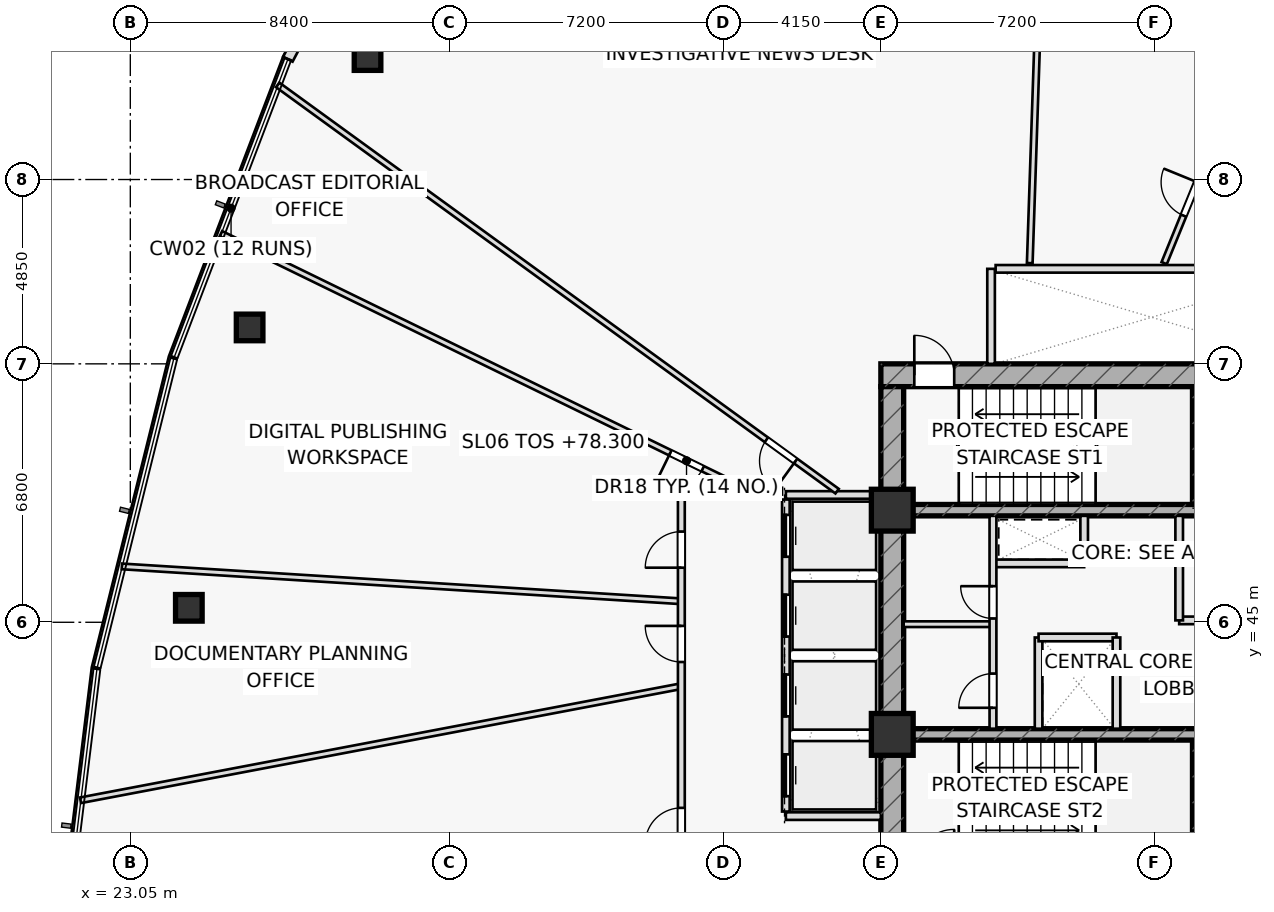
"""IFC4 building model, lengths in metres.
Left out: names, types, materials, properties, quantities, classifications, styles, units other than length and angle.
Written with IfcOpenShell. Run it as: python <this file> out.ifc"""

import sys

from ifc_helpers import new_model, si_unit, direction, frame, frame_2d, origin, origin_2d, place, context, subcontext, project, spatial, rectangle, hollow_rectangle, extrude, element, fill, save


model = new_model("IFC4")
c1 = context("Model", 3, precision=1e-05, world=origin(), true_north=direction((0.0, 1.0)))
c2 = subcontext(c1, "Body", "Model", "MODEL_VIEW")
j1 = project(units=[si_unit("LENGTHUNIT", "METRE"), si_unit("PLANEANGLEUNIT", "RADIAN")], contexts=[c1])
p1 = place(None, origin())
s1 = spatial("IfcSite", under=j1, at=p1, CompositionType="ELEMENT")
p2 = place(p1, origin())
s2 = spatial("IfcBuilding", under=s1, at=p2, CompositionType="ELEMENT")
p3 = place(p2, frame((0.0, 0.0, 78.3)))
s3 = spatial("IfcBuildingStorey", under=s2, at=p3, CompositionType="ELEMENT", Elevation=78.3)
for number, where, z_axis, x_axis in (
    (1, (51.11, 48.1, 0.0), (0.0, 0.0, 1.0), (0.0, 1.0, 0.0)),
    (2, (51.11, 38.8, 0.0), (0.0, 0.0, 1.0), (0.0, 1.0, 0.0)),
):
    element("IfcWall", number, at=place(p3, frame(where, z_axis=z_axis, x_axis=x_axis)), inside=s3, PredefinedType="SHEAR", context=c2, shape_type="SweptSolid", body=[
        extrude(rectangle(XDim=3.1, YDim=0.22, at=frame_2d((1.55, 0.0))), origin(), (0.0, 0.0, 1.0), 3.6),
    ])
p4 = place(p3, frame((42.8, 51.5, 0.0), z_axis=(0.0, 0.0, 1.0), x_axis=(1.0, 0.0, 0.0)))
e3 = element("IfcWall", 3, at=p4, inside=s3, PredefinedType="SHEAR", context=c2, shape_type="SweptSolid", body=[
    extrude(rectangle(XDim=14.4, YDim=0.6, at=frame_2d((7.2, 0.0))), origin(), (0.0, 0.0, 1.0), 3.6),
])
p5 = place(p4, frame((0.88, 0.0, 0.0)))
e4 = element("IfcOpeningElement", 4, at=p5, cuts=e3, PredefinedType="OPENING", context=c2, shape_type="SweptSolid", body=[
    extrude(rectangle(XDim=1.05, YDim=2.2, at=frame_2d((0.525, 1.1))), frame((0.0, 0.31, 0.0), z_axis=(0.0, -1.0, 0.0), x_axis=(1.0, 0.0, 0.0)), (0.0, 0.0, 1.0), 0.62),
])
p6 = place(p3, frame((43.1, 38.8, 0.0), z_axis=(0.0, 0.0, 1.0), x_axis=(0.0, 1.0, 0.0)))
e5 = element("IfcWall", 5, at=p6, inside=s3, PredefinedType="SHEAR", context=c2, shape_type="SweptSolid", body=[
    extrude(rectangle(XDim=12.4, YDim=0.6, at=frame_2d((6.2, 0.0))), origin(), (0.0, 0.0, 1.0), 3.6),
])
p7 = place(p3, frame((43.4, 47.95, 0.0), z_axis=(0.0, 0.0, 1.0), x_axis=(1.0, 0.0, 0.0)))
e6 = element("IfcWall", 6, at=p7, inside=s3, PredefinedType="SHEAR", context=c2, shape_type="SweptSolid", body=[
    extrude(rectangle(XDim=13.2, YDim=0.3, at=frame_2d((6.6, 0.0))), origin(), (0.0, 0.0, 1.0), 3.6),
])
p8 = place(p7, frame((8.345, 0.0, 0.0)))
e7 = element("IfcOpeningElement", 7, at=p8, cuts=e6, PredefinedType="OPENING", context=c2, shape_type="SweptSolid", body=[
    extrude(rectangle(XDim=1.15, YDim=2.2, at=frame_2d((0.575, 1.1))), frame((0.0, 0.16, 0.0), z_axis=(0.0, -1.0, 0.0), x_axis=(1.0, 0.0, 0.0)), (0.0, 0.0, 1.0), 0.32),
])
p9 = place(p7, frame((10.065, 0.0, 0.0)))
e8 = element("IfcOpeningElement", 8, at=p9, cuts=e6, PredefinedType="OPENING", context=c2, shape_type="SweptSolid", body=[
    extrude(rectangle(XDim=1.15, YDim=2.2, at=frame_2d((0.575, 1.1))), frame((0.0, 0.16, 0.0), z_axis=(0.0, -1.0, 0.0), x_axis=(1.0, 0.0, 0.0)), (0.0, 0.0, 1.0), 0.32),
])
p10 = place(p7, frame((11.645, 0.0, 0.0)))
e9 = element("IfcOpeningElement", 9, at=p10, cuts=e6, PredefinedType="OPENING", context=c2, shape_type="SweptSolid", body=[
    extrude(rectangle(XDim=1.15, YDim=2.2, at=frame_2d((0.575, 1.1))), frame((0.0, 0.16, 0.0), z_axis=(0.0, -1.0, 0.0), x_axis=(1.0, 0.0, 0.0)), (0.0, 0.0, 1.0), 0.32),
])
p11 = place(p3, frame((43.4, 42.05, 0.0), z_axis=(0.0, 0.0, 1.0), x_axis=(1.0, 0.0, 0.0)))
e10 = element("IfcWall", 10, at=p11, inside=s3, PredefinedType="SHEAR", context=c2, shape_type="SweptSolid", body=[
    extrude(rectangle(XDim=13.2, YDim=0.3, at=frame_2d((6.6, 0.0))), origin(), (0.0, 0.0, 1.0), 3.6),
])
for number, where, z_axis, x_axis in (
    (11, (43.1, 47.95, 0.0), (0.0, 0.0, 1.0), (1.0, 0.0, 0.0)),
    (12, (43.1, 42.05, 0.0), (0.0, 0.0, 1.0), (1.0, 0.0, 0.0)),
):
    element("IfcColumn", number, at=place(p3, frame(where, z_axis=z_axis, x_axis=x_axis)), inside=s3, PredefinedType="COLUMN", context=c2, shape_type="SweptSolid", body=[
        extrude(rectangle(XDim=1.1, YDim=1.1, at=origin_2d()), origin(), (0.0, 0.0, 1.0), 3.6),
    ])
for number, where, z_axis, x_axis in (
    (13, (29.292, 59.872, 0.0), (0.0, 0.0, 1.0), (1.0, 0.0, 0.0)),
    (14, (26.189, 52.758, 0.0), (0.0, 0.0, 1.0), (1.0, 0.0, 0.0)),
    (15, (24.59, 45.381, 0.0), (0.0, 0.0, 1.0), (1.0, 0.0, 0.0)),
):
    element("IfcColumn", number, at=place(p3, frame(where, z_axis=z_axis, x_axis=x_axis)), inside=s3, PredefinedType="COLUMN", context=c2, shape_type="SweptSolid", body=[
        extrude(hollow_rectangle(XDim=0.7, YDim=0.7, WallThickness=0.04, at=origin_2d()), origin(), (0.0, 0.0, 1.0), 3.6),
    ])
for number, where, z_axis, x_axis in (
    (16, (40.3, 39.9, 0.0), (0.0, 0.0, 1.0), (1.0, 0.0, 0.0)),
    (17, (40.3, 48.35, 0.0), (0.0, 0.0, 1.0), (1.0, 0.0, 0.0)),
    (18, (45.7, 51.8, 0.0), (0.0, 0.0, 1.0), (0.0, 1.0, 0.0)),
):
    element("IfcWall", number, at=place(p3, frame(where, z_axis=z_axis, x_axis=x_axis)), inside=s3, PredefinedType="PARTITIONING", context=c2, shape_type="SweptSolid", body=[
        extrude(rectangle(XDim=2.5, YDim=0.2, at=frame_2d((1.25, 0.0))), origin(), (0.0, 0.0, 1.0), 3.6),
    ])
p12 = place(p3, frame((45.75, 46.55, 0.0), z_axis=(0.0, 0.0, 1.0), x_axis=(1.0, 0.0, 0.0)))
e19 = element("IfcWall", 19, at=p12, inside=s3, PredefinedType="PARTITIONING", context=c2, shape_type="SweptSolid", body=[
    extrude(rectangle(XDim=2.4, YDim=0.2, at=frame_2d((1.2, 0.0))), origin(), (0.0, 0.0, 1.0), 3.6),
])
p13 = place(p3, frame((48.15, 46.55, 0.0), z_axis=(0.0, 0.0, 1.0), x_axis=(0.0, 1.0, 0.0)))
e20 = element("IfcWall", 20, at=p13, inside=s3, PredefinedType="PARTITIONING", context=c2, shape_type="SweptSolid", body=[
    extrude(rectangle(XDim=1.25, YDim=0.2, at=frame_2d((0.625, 0.0))), origin(), (0.0, 0.0, 1.0), 3.6),
])
p14 = place(p3, frame((46.95, 42.2, 0.0), z_axis=(0.0, 0.0, 1.0), x_axis=(0.0, 1.0, 0.0)))
e21 = element("IfcWall", 21, at=p14, inside=s3, PredefinedType="PARTITIONING", context=c2, shape_type="SweptSolid", body=[
    extrude(rectangle(XDim=2.4, YDim=0.2, at=frame_2d((1.2, 0.0))), origin(), (0.0, 0.0, 1.0), 3.6),
])
p15 = place(p3, frame((46.95, 44.6, 0.0), z_axis=(0.0, 0.0, 1.0), x_axis=(1.0, 0.0, 0.0)))
e22 = element("IfcWall", 22, at=p15, inside=s3, PredefinedType="PARTITIONING", context=c2, shape_type="SweptSolid", body=[
    extrude(rectangle(XDim=2.05, YDim=0.2, at=frame_2d((1.025, 0.0))), origin(), (0.0, 0.0, 1.0), 3.6),
])
p16 = place(p3, frame((50.65, 45.05, 0.0), z_axis=(0.0, 0.0, 1.0), x_axis=(1.0, 0.0, 0.0)))
e23 = element("IfcWall", 23, at=p16, inside=s3, PredefinedType="PARTITIONING", context=c2, shape_type="SweptSolid", body=[
    extrude(rectangle(XDim=5.95, YDim=0.2, at=frame_2d((2.975, 0.0))), origin(), (0.0, 0.0, 1.0), 3.6),
])
p17 = place(p16, frame((1.35, 0.0, 0.0)))
e24 = element("IfcOpeningElement", 24, at=p17, cuts=e23, PredefinedType="OPENING", context=c2, shape_type="SweptSolid", body=[
    extrude(rectangle(XDim=1.5, YDim=2.2, at=frame_2d((0.75, 1.1))), frame((0.0, 0.11, 0.0), z_axis=(0.0, -1.0, 0.0), x_axis=(1.0, 0.0, 0.0)), (0.0, 0.0, 1.0), 0.22),
])
p18 = place(p3, frame((50.65, 45.05, 0.0), z_axis=(0.0, 0.0, 1.0), x_axis=(0.0, 1.0, 0.0)))
e25 = element("IfcWall", 25, at=p18, inside=s3, PredefinedType="PARTITIONING", context=c2, shape_type="SweptSolid", body=[
    extrude(rectangle(XDim=2.75, YDim=0.2, at=frame_2d((1.375, 0.0))), origin(), (0.0, 0.0, 1.0), 3.6),
])
p19 = place(p3, frame((43.4, 44.95, 0.0), z_axis=(0.0, 0.0, 1.0), x_axis=(1.0, 0.0, 0.0)))
e26 = element("IfcWall", 26, at=p19, inside=s3, PredefinedType="PARTITIONING", context=c2, shape_type="SweptSolid", body=[
    extrude(rectangle(XDim=2.35, YDim=0.15, at=frame_2d((1.175, 0.0))), origin(), (0.0, 0.0, 1.0), 3.6),
])
p20 = place(p3, frame((45.75, 42.2, 0.0), z_axis=(0.0, 0.0, 1.0), x_axis=(0.0, 1.0, 0.0)))
e27 = element("IfcWall", 27, at=p20, inside=s3, PredefinedType="PARTITIONING", context=c2, shape_type="SweptSolid", body=[
    extrude(rectangle(XDim=5.6, YDim=0.18, at=frame_2d((2.8, 0.0))), origin(), (0.0, 0.0, 1.0), 3.6),
])
p21 = place(p20, frame((0.55, 0.0, 0.0)))
e28 = element("IfcOpeningElement", 28, at=p21, cuts=e27, PredefinedType="OPENING", context=c2, shape_type="SweptSolid", body=[
    extrude(rectangle(XDim=0.9, YDim=2.05, at=frame_2d((0.45, 1.025))), frame((0.0, 0.1, 0.0), z_axis=(0.0, -1.0, 0.0), x_axis=(1.0, 0.0, 0.0)), (0.0, 0.0, 1.0), 0.2),
])
p22 = place(p20, frame((2.9, 0.0, 0.0)))
e29 = element("IfcOpeningElement", 29, at=p22, cuts=e27, PredefinedType="OPENING", context=c2, shape_type="SweptSolid", body=[
    extrude(rectangle(XDim=0.85, YDim=2.05, at=frame_2d((0.425, 1.025))), frame((0.0, 0.1, 0.0), z_axis=(0.0, -1.0, 0.0), x_axis=(1.0, 0.0, 0.0)), (0.0, 0.0, 1.0), 0.2),
])
p23 = place(p3, frame((39.326, 48.45, 0.0), z_axis=(0.0, 0.0, 1.0), x_axis=(-0.898790760356, 0.438377883907, 0.0)))
e30 = element("IfcWall", 30, at=p23, inside=s3, PredefinedType="PARTITIONING", context=c2, shape_type="SweptSolid", body=[
    extrude(rectangle(XDim=15.456, YDim=0.15, at=frame_2d((7.728, 0.0))), origin(), (0.0, 0.0, 1.0), 2.975),
])
p24 = place(p23, frame((1.35, 0.0, 0.0)))
e31 = element("IfcOpeningElement", 31, at=p24, cuts=e30, PredefinedType="OPENING", context=c2, shape_type="SweptSolid", body=[
    extrude(rectangle(XDim=0.95, YDim=2.05, at=frame_2d((0.475, 1.025))), frame((0.0, 0.085, 0.0), z_axis=(0.0, -1.0, 0.0), x_axis=(1.0, 0.0, 0.0)), (0.0, 0.0, 1.0), 0.17),
])
p25 = place(p3, frame((37.55, 45.552, 0.0), z_axis=(0.0, 0.0, 1.0), x_axis=(-0.99806062042, 0.062249481657, 0.0)))
e32 = element("IfcWall", 32, at=p25, inside=s3, PredefinedType="PARTITIONING", context=c2, shape_type="SweptSolid", body=[
    extrude(rectangle(XDim=14.75, YDim=0.15, at=frame_2d((7.375, 0.0))), origin(), (0.0, 0.0, 1.0), 2.975),
])
p26 = place(p3, frame((37.55, 43.319, 0.0), z_axis=(0.0, 0.0, 1.0), x_axis=(-0.982437746544, -0.186590659376, 0.0)))
e33 = element("IfcWall", 33, at=p26, inside=s3, PredefinedType="PARTITIONING", context=c2, shape_type="SweptSolid", body=[
    extrude(rectangle(XDim=16.094, YDim=0.15, at=frame_2d((8.047, 0.0))), origin(), (0.0, 0.0, 1.0), 3.025),
])
p27 = place(p3, frame((50.255, 54.45, 0.0), z_axis=(0.0, 0.0, 1.0), x_axis=(0.377744353623, 0.92590993261, 0.0)))
e34 = element("IfcWall", 34, at=p27, inside=s3, PredefinedType="PARTITIONING", context=c2, shape_type="SweptSolid", body=[
    extrude(rectangle(XDim=14.522, YDim=0.15, at=frame_2d((7.261, 0.0))), origin(), (0.0, 0.0, 1.0), 2.975),
])
p28 = place(p27, frame((1.35, 0.0, 0.0)))
e35 = element("IfcOpeningElement", 35, at=p28, cuts=e34, PredefinedType="OPENING", context=c2, shape_type="SweptSolid", body=[
    extrude(rectangle(XDim=0.95, YDim=2.05, at=frame_2d((0.475, 1.025))), frame((0.0, 0.085, 0.0), z_axis=(0.0, -1.0, 0.0), x_axis=(1.0, 0.0, 0.0)), (0.0, 0.0, 1.0), 0.17),
])
p29 = place(p3, frame((46.718, 54.45, 0.0), z_axis=(0.0, 0.0, 1.0), x_axis=(0.033591693119, 0.999435639825, 0.0)))
e36 = element("IfcWall", 36, at=p29, inside=s3, PredefinedType="PARTITIONING", context=c2, shape_type="SweptSolid", body=[
    extrude(rectangle(XDim=19.173, YDim=0.15, at=frame_2d((9.586, 0.0))), origin(), (0.0, 0.0, 1.0), 3.025),
])
p30 = place(p3, frame((41.649, 48.45, 0.0), z_axis=(0.0, 0.0, 1.0), x_axis=(-0.809164130734, 0.587582683146, 0.0)))
e37 = element("IfcWall", 37, at=p30, inside=s3, PredefinedType="PARTITIONING", context=c2, shape_type="SweptSolid", body=[
    extrude(rectangle(XDim=18.193, YDim=0.15, at=frame_2d((9.097, 0.0))), origin(), (0.0, 0.0, 1.0), 2.975),
])
p31 = place(p30, frame((1.35, 0.0, 0.0)))
e38 = element("IfcOpeningElement", 38, at=p31, cuts=e37, PredefinedType="OPENING", context=c2, shape_type="SweptSolid", body=[
    extrude(rectangle(XDim=0.95, YDim=2.05, at=frame_2d((0.475, 1.025))), frame((0.0, 0.085, 0.0), z_axis=(0.0, -1.0, 0.0), x_axis=(1.0, 0.0, 0.0)), (0.0, 0.0, 1.0), 0.17),
])
p32 = place(p3, frame((37.55, 35.75, 0.0), z_axis=(0.0, 0.0, 1.0), x_axis=(0.0, 1.0, 0.0)))
e39 = element("IfcWall", 39, at=p32, inside=s3, PredefinedType="PARTITIONING", context=c2, shape_type="SweptSolid", body=[
    extrude(rectangle(XDim=12.75, YDim=0.18, at=frame_2d((6.375, 0.0))), origin(), (0.0, 0.0, 1.0), 2.975),
])
p33 = place(p32, frame((3.417, 0.0, 0.0)))
e40 = element("IfcOpeningElement", 40, at=p33, cuts=e39, PredefinedType="OPENING", context=c2, shape_type="SweptSolid", body=[
    extrude(rectangle(XDim=0.95, YDim=2.05, at=frame_2d((0.475, 1.025))), frame((0.0, 0.1, 0.0), z_axis=(0.0, -1.0, 0.0), x_axis=(1.0, 0.0, 0.0)), (0.0, 0.0, 1.0), 0.2),
])
p34 = place(p32, frame((8.205, 0.0, 0.0)))
e41 = element("IfcOpeningElement", 41, at=p34, cuts=e39, PredefinedType="OPENING", context=c2, shape_type="SweptSolid", body=[
    extrude(rectangle(XDim=0.95, YDim=2.05, at=frame_2d((0.475, 1.025))), frame((0.0, 0.1, 0.0), z_axis=(0.0, -1.0, 0.0), x_axis=(1.0, 0.0, 0.0)), (0.0, 0.0, 1.0), 0.2),
])
p35 = place(p32, frame((10.687, 0.0, 0.0)))
e42 = element("IfcOpeningElement", 42, at=p35, cuts=e39, PredefinedType="OPENING", context=c2, shape_type="SweptSolid", body=[
    extrude(rectangle(XDim=0.95, YDim=2.05, at=frame_2d((0.475, 1.025))), frame((0.0, 0.1, 0.0), z_axis=(0.0, -1.0, 0.0), x_axis=(1.0, 0.0, 0.0)), (0.0, 0.0, 1.0), 0.2),
])
p36 = place(p3, frame((37.5, 48.45, 0.0), z_axis=(0.0, 0.0, 1.0), x_axis=(1.0, 0.0, 0.0)))
e43 = element("IfcWall", 43, at=p36, inside=s3, PredefinedType="PARTITIONING", context=c2, shape_type="SweptSolid", body=[
    extrude(rectangle(XDim=2.7, YDim=0.18, at=frame_2d((1.35, 0.0))), origin(), (0.0, 0.0, 1.0), 3.6),
])
p37 = place(p3, frame((31.132, 67.275, 0.0), z_axis=(0.0, 0.0, 1.0), x_axis=(-0.466778115756, -0.884374462912, 0.0)))
e44 = element("IfcWall", 44, at=p37, inside=s3, PredefinedType="STANDARD", context=c2, shape_type="SweptSolid", body=[
    extrude(rectangle(XDim=8.434, YDim=0.28, at=frame_2d((4.217, 0.0))), origin(), (0.0, 0.0, 1.0), 3.6),
])
p38 = place(p3, frame((40.3, 40.02, 0.0), z_axis=(0.0, 0.0, 1.0), x_axis=(0.0, 1.0, 0.0)))
e45 = element("IfcWall", 45, at=p38, inside=s3, PredefinedType="PARTITIONING", context=c2, shape_type="SweptSolid", body=[
    extrude(rectangle(XDim=8.21, YDim=0.2, at=frame_2d((4.105, 0.0))), origin(), (0.0, 0.0, 1.0), 3.6),
])
p39 = place(p38, frame((0.405, 0.0, 0.0)))
e46 = element("IfcOpeningElement", 46, at=p39, cuts=e45, PredefinedType="OPENING", context=c2, shape_type="SweptSolid", body=[
    extrude(rectangle(XDim=1.1, YDim=2.15, at=frame_2d((0.55, 1.075))), frame((0.0, 0.11, 0.0), z_axis=(0.0, -1.0, 0.0), x_axis=(1.0, 0.0, 0.0)), (0.0, 0.0, 1.0), 0.22),
])
p40 = place(p38, frame((2.505, 0.0, 0.0)))
e47 = element("IfcOpeningElement", 47, at=p40, cuts=e45, PredefinedType="OPENING", context=c2, shape_type="SweptSolid", body=[
    extrude(rectangle(XDim=1.1, YDim=2.15, at=frame_2d((0.55, 1.075))), frame((0.0, 0.11, 0.0), z_axis=(0.0, -1.0, 0.0), x_axis=(1.0, 0.0, 0.0)), (0.0, 0.0, 1.0), 0.22),
])
p41 = place(p38, frame((4.605, 0.0, 0.0)))
e48 = element("IfcOpeningElement", 48, at=p41, cuts=e45, PredefinedType="OPENING", context=c2, shape_type="SweptSolid", body=[
    extrude(rectangle(XDim=1.1, YDim=2.15, at=frame_2d((0.55, 1.075))), frame((0.0, 0.11, 0.0), z_axis=(0.0, -1.0, 0.0), x_axis=(1.0, 0.0, 0.0)), (0.0, 0.0, 1.0), 0.22),
])
p42 = place(p38, frame((6.705, 0.0, 0.0)))
e49 = element("IfcOpeningElement", 49, at=p42, cuts=e45, PredefinedType="OPENING", context=c2, shape_type="SweptSolid", body=[
    extrude(rectangle(XDim=1.1, YDim=2.15, at=frame_2d((0.55, 1.075))), frame((0.0, 0.11, 0.0), z_axis=(0.0, -1.0, 0.0), x_axis=(1.0, 0.0, 0.0)), (0.0, 0.0, 1.0), 0.22),
])
p43 = place(p3, frame((49.0, 42.2, 0.0), z_axis=(0.0, 0.0, 1.0), x_axis=(0.0, 1.0, 0.0)))
e50 = element("IfcWall", 50, at=p43, inside=s3, PredefinedType="PARTITIONING", context=c2, shape_type="SweptSolid", body=[
    extrude(rectangle(XDim=2.4, YDim=0.2, at=frame_2d((1.2, 0.0))), origin(), (0.0, 0.0, 1.0), 3.6),
])
p44 = place(p3, frame((45.82, 54.3, 0.0), z_axis=(0.0, 0.0, 1.0), x_axis=(1.0, 0.0, 0.0)))
e51 = element("IfcWall", 51, at=p44, inside=s3, PredefinedType="PARTITIONING", context=c2, shape_type="SweptSolid", body=[
    extrude(rectangle(XDim=8.31, YDim=0.2, at=frame_2d((4.155, 0.0))), origin(), (0.0, 0.0, 1.0), 3.6),
])
p45 = place(p5, origin())
e52 = element("IfcDoor", 52, at=p45, inside=s3, OperationType="SINGLE_SWING_LEFT", PredefinedType="DOOR", context=c2, shape_type="SweptSolid", body=[
    extrude(rectangle(XDim=1.05, YDim=2.2, at=frame_2d((0.525, 1.1))), frame((0.0, 0.025, 0.0), z_axis=(0.0, -1.0, 0.0), x_axis=(1.0, 0.0, 0.0)), (0.0, 0.0, 1.0), 0.05),
])
fill(e4, e52)
p46 = place(p21, origin())
e53 = element("IfcDoor", 53, at=p46, inside=s3, OperationType="SINGLE_SWING_LEFT", PredefinedType="DOOR", context=c2, shape_type="SweptSolid", body=[
    extrude(rectangle(XDim=0.9, YDim=2.05, at=frame_2d((0.45, 1.025))), frame((0.0, 0.025, 0.0), z_axis=(0.0, -1.0, 0.0), x_axis=(1.0, 0.0, 0.0)), (0.0, 0.0, 1.0), 0.05),
])
fill(e28, e53)
p47 = place(p22, origin())
e54 = element("IfcDoor", 54, at=p47, inside=s3, OperationType="SINGLE_SWING_RIGHT", PredefinedType="DOOR", context=c2, shape_type="SweptSolid", body=[
    extrude(rectangle(XDim=0.85, YDim=2.05, at=frame_2d((0.425, 1.025))), frame((0.0, 0.025, 0.0), z_axis=(0.0, -1.0, 0.0), x_axis=(1.0, 0.0, 0.0)), (0.0, 0.0, 1.0), 0.05),
])
fill(e29, e54)
p48 = place(p24, origin())
e55 = element("IfcDoor", 55, at=p48, inside=s3, OperationType="SINGLE_SWING_RIGHT", PredefinedType="DOOR", context=c2, shape_type="SweptSolid", body=[
    extrude(rectangle(XDim=0.95, YDim=2.05, at=frame_2d((0.475, 1.025))), frame((0.0, 0.025, 0.0), z_axis=(0.0, -1.0, 0.0), x_axis=(1.0, 0.0, 0.0)), (0.0, 0.0, 1.0), 0.05),
])
fill(e31, e55)
p49 = place(p28, origin())
e56 = element("IfcDoor", 56, at=p49, inside=s3, OperationType="SINGLE_SWING_RIGHT", PredefinedType="DOOR", context=c2, shape_type="SweptSolid", body=[
    extrude(rectangle(XDim=0.95, YDim=2.05, at=frame_2d((0.475, 1.025))), frame((0.0, 0.025, 0.0), z_axis=(0.0, -1.0, 0.0), x_axis=(1.0, 0.0, 0.0)), (0.0, 0.0, 1.0), 0.05),
])
fill(e35, e56)
p50 = place(p31, origin())
e57 = element("IfcDoor", 57, at=p50, inside=s3, OperationType="SINGLE_SWING_LEFT", PredefinedType="DOOR", context=c2, shape_type="SweptSolid", body=[
    extrude(rectangle(XDim=0.95, YDim=2.05, at=frame_2d((0.475, 1.025))), frame((0.0, 0.025, 0.0), z_axis=(0.0, -1.0, 0.0), x_axis=(1.0, 0.0, 0.0)), (0.0, 0.0, 1.0), 0.05),
])
fill(e38, e57)
p51 = place(p33, origin())
e58 = element("IfcDoor", 58, at=p51, inside=s3, OperationType="SINGLE_SWING_LEFT", PredefinedType="DOOR", context=c2, shape_type="SweptSolid", body=[
    extrude(rectangle(XDim=0.95, YDim=2.05, at=frame_2d((0.475, 1.025))), frame((0.0, 0.025, 0.0), z_axis=(0.0, -1.0, 0.0), x_axis=(1.0, 0.0, 0.0)), (0.0, 0.0, 1.0), 0.05),
])
fill(e40, e58)
p52 = place(p34, origin())
e59 = element("IfcDoor", 59, at=p52, inside=s3, OperationType="SINGLE_SWING_RIGHT", PredefinedType="DOOR", context=c2, shape_type="SweptSolid", body=[
    extrude(rectangle(XDim=0.95, YDim=2.05, at=frame_2d((0.475, 1.025))), frame((0.0, 0.025, 0.0), z_axis=(0.0, -1.0, 0.0), x_axis=(1.0, 0.0, 0.0)), (0.0, 0.0, 1.0), 0.05),
])
fill(e41, e59)
p53 = place(p35, origin())
e60 = element("IfcDoor", 60, at=p53, inside=s3, OperationType="SINGLE_SWING_LEFT", PredefinedType="DOOR", context=c2, shape_type="SweptSolid", body=[
    extrude(rectangle(XDim=0.95, YDim=2.05, at=frame_2d((0.475, 1.025))), frame((0.0, 0.025, 0.0), z_axis=(0.0, -1.0, 0.0), x_axis=(1.0, 0.0, 0.0)), (0.0, 0.0, 1.0), 0.05),
])
fill(e42, e60)
p54 = place(p39, origin())
e61 = element("IfcDoor", 61, at=p54, inside=s3, OperationType="SLIDING_TO_LEFT", PredefinedType="DOOR", context=c2, shape_type="SweptSolid", body=[
    extrude(rectangle(XDim=1.1, YDim=2.15, at=frame_2d((0.55, 1.075))), frame((0.0, 0.025, 0.0), z_axis=(0.0, -1.0, 0.0), x_axis=(1.0, 0.0, 0.0)), (0.0, 0.0, 1.0), 0.05),
])
fill(e46, e61)
p55 = place(p40, origin())
e62 = element("IfcDoor", 62, at=p55, inside=s3, OperationType="SLIDING_TO_RIGHT", PredefinedType="DOOR", context=c2, shape_type="SweptSolid", body=[
    extrude(rectangle(XDim=1.1, YDim=2.15, at=frame_2d((0.55, 1.075))), frame((0.0, 0.025, 0.0), z_axis=(0.0, -1.0, 0.0), x_axis=(1.0, 0.0, 0.0)), (0.0, 0.0, 1.0), 0.05),
])
fill(e47, e62)
p56 = place(p41, origin())
e63 = element("IfcDoor", 63, at=p56, inside=s3, OperationType="SLIDING_TO_LEFT", PredefinedType="DOOR", context=c2, shape_type="SweptSolid", body=[
    extrude(rectangle(XDim=1.1, YDim=2.15, at=frame_2d((0.55, 1.075))), frame((0.0, 0.025, 0.0), z_axis=(0.0, -1.0, 0.0), x_axis=(1.0, 0.0, 0.0)), (0.0, 0.0, 1.0), 0.05),
])
fill(e48, e63)
p57 = place(p42, origin())
e64 = element("IfcDoor", 64, at=p57, inside=s3, OperationType="SLIDING_TO_RIGHT", PredefinedType="DOOR", context=c2, shape_type="SweptSolid", body=[
    extrude(rectangle(XDim=1.1, YDim=2.15, at=frame_2d((0.55, 1.075))), frame((0.0, 0.025, 0.0), z_axis=(0.0, -1.0, 0.0), x_axis=(1.0, 0.0, 0.0)), (0.0, 0.0, 1.0), 0.05),
])
fill(e49, e64)
save(model, sys.argv[1])
